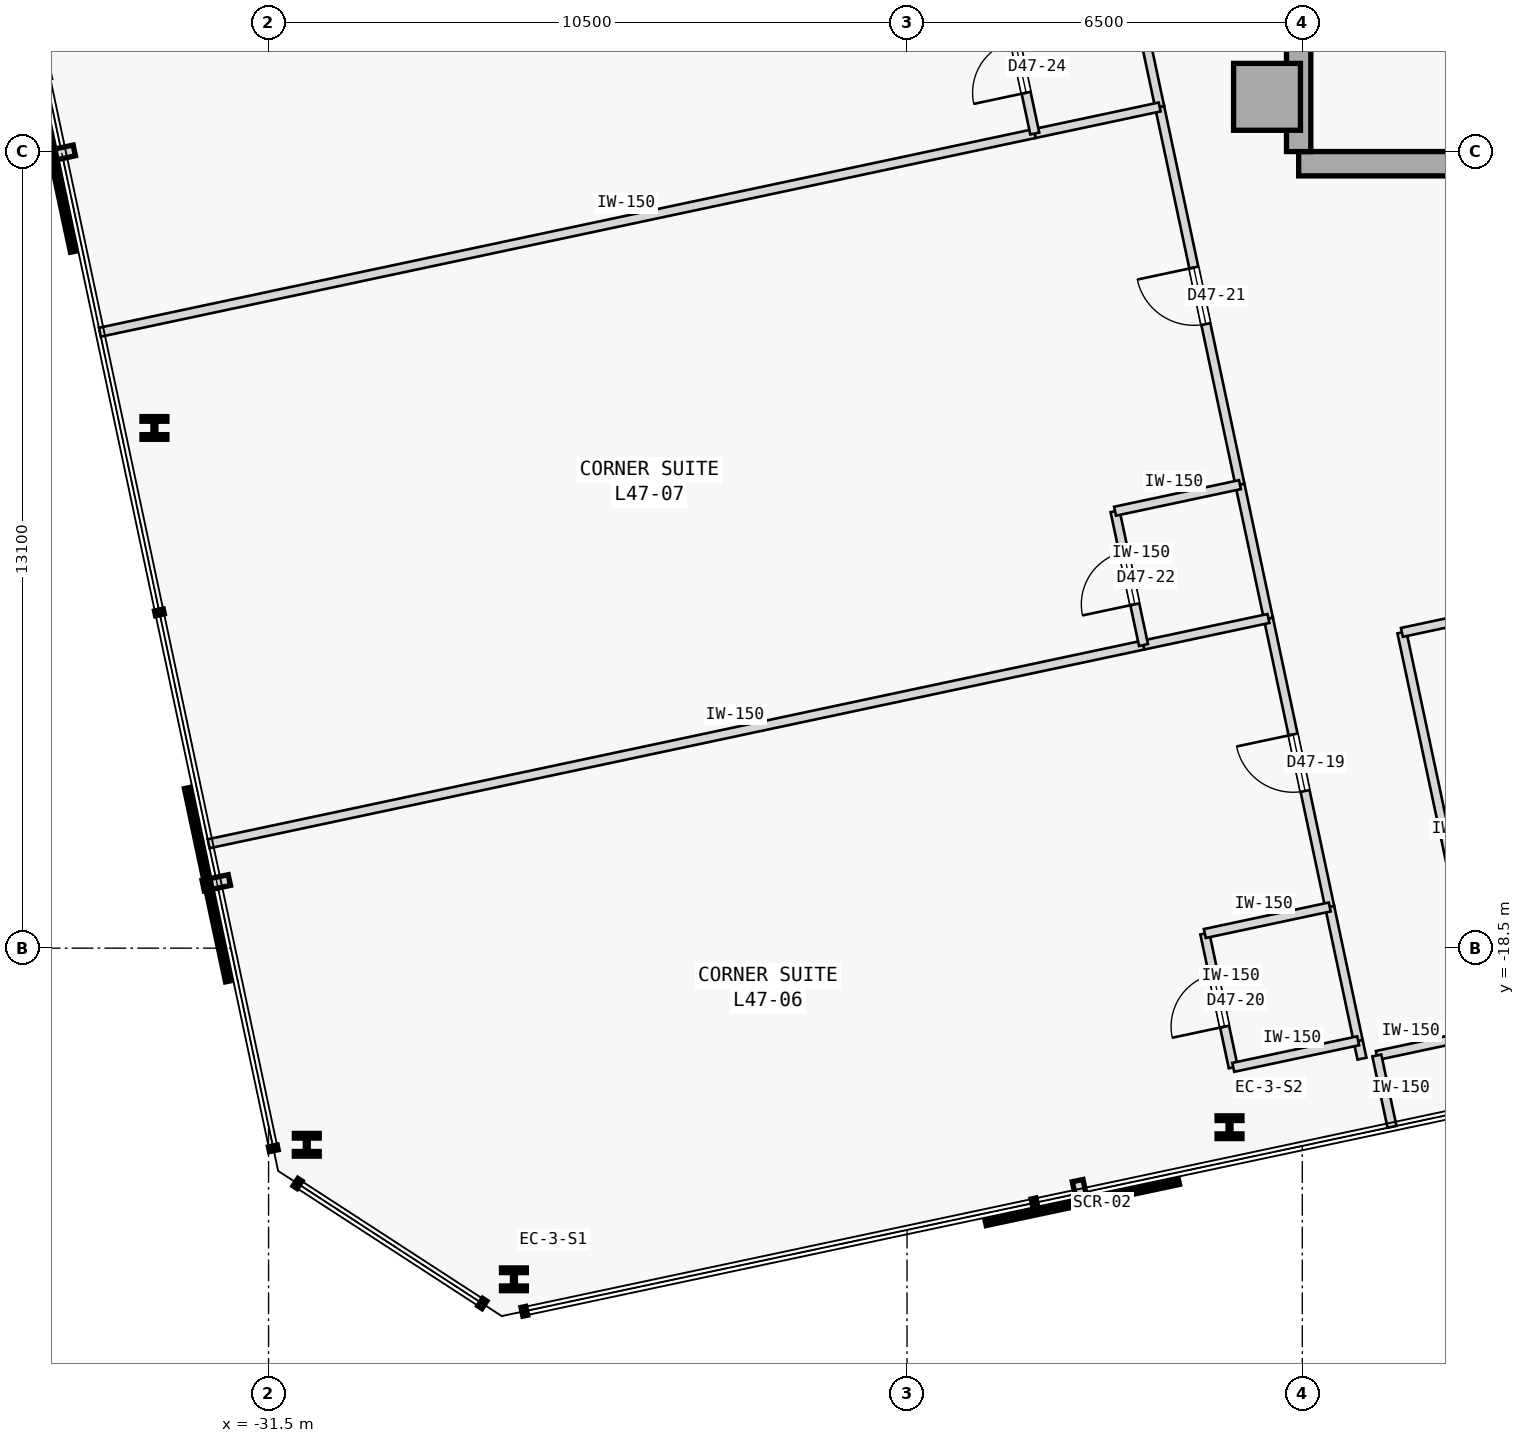
"""IFC4 building model, lengths in metres.
Left out: names, types, materials, properties, quantities, classifications, styles, units other than length and angle.
Written with IfcOpenShell. Run it as: python <this file> out.ifc"""

import sys

from ifc_helpers import new_model, si_unit, direction, frame, frame_2d, origin, origin_2d, place, context, subcontext, project, spatial, rectangle, i_section, extrude, element, fill, save


model = new_model("IFC4")
c1 = context("Model", 3, precision=1e-05, world=origin(), true_north=direction((0.0, 1.0)))
c2 = subcontext(c1, "Body", "Model", "MODEL_VIEW")
j1 = project(units=[si_unit("LENGTHUNIT", "METRE"), si_unit("PLANEANGLEUNIT", "RADIAN")], contexts=[c1])
p1 = place(None, origin())
s1 = spatial("IfcSite", under=j1, at=p1, CompositionType="ELEMENT")
p2 = place(p1, origin())
s2 = spatial("IfcBuilding", under=s1, at=p2, CompositionType="ELEMENT")
p3 = place(p2, frame((0.0, 0.0, 182.0)))
s3 = spatial("IfcBuildingStorey", under=s2, at=p3, CompositionType="ELEMENT", Elevation=182.0)
p4 = place(p3, frame((-15.08, -4.5, 0.0), z_axis=(0.0, 0.0, 1.0), x_axis=(1.0, 0.0, 0.0)))
e1 = element("IfcColumn", 1, at=p4, inside=s3, PredefinedType="COLUMN", context=c2, shape_type="SweptSolid", body=[
    extrude(rectangle(XDim=1.1, YDim=1.1, at=origin_2d()), origin(), (0.0, 0.0, 1.0), 3.4),
])
p5 = place(p3, frame((-14.56, -5.6, 0.0), z_axis=(0.0, 0.0, 1.0), x_axis=(1.0, 0.0, 0.0)))
e2 = element("IfcWall", 2, at=p5, inside=s3, PredefinedType="SHEAR", context=c2, shape_type="SweptSolid", body=[
    extrude(rectangle(XDim=10.86, YDim=0.4, at=frame_2d((5.43, 0.0))), origin(), (0.0, 0.0, 1.0), 3.175),
])
p6 = place(p3, frame((-14.56, -5.4, 0.0), z_axis=(0.0, 0.0, 1.0), x_axis=(0.0, 1.0, 0.0)))
e3 = element("IfcWall", 3, at=p6, inside=s3, PredefinedType="SHEAR", context=c2, shape_type="SweptSolid", body=[
    extrude(rectangle(XDim=10.8, YDim=0.4, at=frame_2d((5.4, 0.0))), origin(), (0.0, 0.0, 1.0), 3.175),
])
for number, where, z_axis, x_axis in (
    (4, (-27.465, -23.946, 0.0), (0.0, 0.0, 1.0), (1.0, 0.0, 0.0)),
    (5, (-15.697, -21.444, 0.0), (0.0, 0.0, 1.0), (1.0, 0.0, 0.0)),
    (6, (-33.377, -9.945, 0.0), (0.0, 0.0, 1.0), (1.0, 0.0, 0.0)),
    (7, (-30.871, -21.733, 0.0), (0.0, 0.0, 1.0), (1.0, 0.0, 0.0)),
):
    element("IfcColumn", number, at=place(p3, frame(where, z_axis=z_axis, x_axis=x_axis)), inside=s3, PredefinedType="COLUMN", context=c2, shape_type="SweptSolid", body=[
        extrude(i_section(OverallWidth=0.409, OverallDepth=0.374, WebThickness=0.048, FlangeThickness=0.077, FilletRadius=0.015, at=origin_2d()), origin(), (0.0, 0.0, 1.0), 3.4),
    ])
p7 = place(p3, frame((-13.274, -20.265, 0.0), z_axis=(0.0, 0.0, 1.0), x_axis=(0.978160192495, 0.207852442415, 0.0)))
e8 = element("IfcWall", 8, at=p7, inside=s3, PredefinedType="PARTITIONING", context=c2, shape_type="SweptSolid", body=[
    extrude(rectangle(XDim=1.85, YDim=0.15, at=frame_2d((0.925, 0.0))), origin(), (0.0, 0.0, 1.0), 3.175),
])
p8 = place(p3, frame((-11.465, -19.88, 0.0), z_axis=(0.0, 0.0, 1.0), x_axis=(-0.207916109912, 0.978146661416, 0.0)))
e9 = element("IfcWall", 9, at=p8, inside=s3, PredefinedType="PARTITIONING", context=c2, shape_type="SweptSolid", body=[
    extrude(rectangle(XDim=6.72, YDim=0.15, at=frame_2d((3.36, 0.0))), origin(), (0.0, 0.0, 1.0), 3.175),
])
p9 = place(p3, frame((-12.862, -13.307, 0.0), z_axis=(0.0, 0.0, 1.0), x_axis=(0.978144096287, 0.20792817726, 0.0)))
e10 = element("IfcWall", 10, at=p9, inside=s3, PredefinedType="PARTITIONING", context=c2, shape_type="SweptSolid", body=[
    extrude(rectangle(XDim=7.781, YDim=0.15, at=frame_2d((3.891, 0.0))), origin(), (0.0, 0.0, 1.0), 3.175),
])
p10 = place(p9, frame((3.43, 0.0, 0.0)))
e11 = element("IfcOpeningElement", 11, at=p10, cuts=e10, PredefinedType="OPENING", context=c2, shape_type="SweptSolid", body=[
    extrude(rectangle(XDim=0.92, YDim=2.15, at=frame_2d((0.46, 1.075))), frame((0.0, 0.085, 0.0), z_axis=(0.0, -1.0, 0.0), x_axis=(1.0, 0.0, 0.0)), (0.0, 0.0, 1.0), 0.17),
])
p11 = place(p3, frame((-13.519, -20.317, 0.0), z_axis=(0.0, 0.0, 1.0), x_axis=(-0.207527808066, 0.978229118806, 0.0)))
e12 = element("IfcWall", 12, at=p11, inside=s3, PredefinedType="PARTITIONING", context=c2, shape_type="SweptSolid", body=[
    extrude(rectangle(XDim=0.3, YDim=0.15, at=frame_2d((0.15, 0.0))), origin(), (0.0, 0.0, 1.0), 3.175),
])
p12 = place(p3, frame((-14.049, -17.823, 0.0), z_axis=(0.0, 0.0, 1.0), x_axis=(-0.2079027059, 0.978149510494, 0.0)))
e13 = element("IfcWall", 13, at=p12, inside=s3, PredefinedType="PARTITIONING", context=c2, shape_type="SweptSolid", body=[
    extrude(rectangle(XDim=4.85, YDim=0.15, at=frame_2d((2.425, 0.0))), origin(), (0.0, 0.0, 1.0), 3.175),
])
p13 = place(p12, frame((1.95, 0.0, 0.0)))
e14 = element("IfcOpeningElement", 14, at=p13, cuts=e13, PredefinedType="OPENING", context=c2, shape_type="SweptSolid", body=[
    extrude(rectangle(XDim=0.95, YDim=2.15, at=frame_2d((0.475, 1.075))), frame((0.0, 0.085, 0.0), z_axis=(0.0, -1.0, 0.0), x_axis=(1.0, 0.0, 0.0)), (0.0, 0.0, 1.0), 0.17),
])
p14 = place(p3, frame((-13.581, -20.023, 0.0), z_axis=(0.0, 0.0, 1.0), x_axis=(-0.207891197838, 0.978151956427, 0.0)))
e15 = element("IfcWall", 15, at=p14, inside=s3, PredefinedType="PARTITIONING", context=c2, shape_type="SweptSolid", body=[
    extrude(rectangle(XDim=2.25, YDim=0.15, at=frame_2d((1.125, 0.0))), origin(), (0.0, 0.0, 1.0), 3.175),
])
p15 = place(p3, frame((-15.525, -10.878, 0.0), z_axis=(0.0, 0.0, 1.0), x_axis=(-0.207887725283, 0.978152694459, 0.0)))
e16 = element("IfcWall", 16, at=p15, inside=s3, PredefinedType="PARTITIONING", context=c2, shape_type="SweptSolid", body=[
    extrude(rectangle(XDim=6.35, YDim=0.15, at=frame_2d((3.175, 0.0))), origin(), (0.0, 0.0, 1.0), 3.175),
])
p16 = place(p15, frame((2.7, 0.0, 0.0)))
e17 = element("IfcOpeningElement", 17, at=p16, cuts=e16, PredefinedType="OPENING", context=c2, shape_type="SweptSolid", body=[
    extrude(rectangle(XDim=0.95, YDim=2.15, at=frame_2d((0.475, 1.075))), frame((0.0, 0.085, 0.0), z_axis=(0.0, -1.0, 0.0), x_axis=(1.0, 0.0, 0.0)), (0.0, 0.0, 1.0), 0.17),
])
p17 = place(p3, frame((-15.057, -13.079, 0.0), z_axis=(0.0, 0.0, 1.0), x_axis=(-0.207995007687, 0.978129887478, 0.0)))
e18 = element("IfcWall", 18, at=p17, inside=s3, PredefinedType="PARTITIONING", context=c2, shape_type="SweptSolid", body=[
    extrude(rectangle(XDim=2.25, YDim=0.15, at=frame_2d((1.125, 0.0))), origin(), (0.0, 0.0, 1.0), 3.175),
])
p18 = place(p3, frame((-16.845, -4.667, 0.0), z_axis=(0.0, 0.0, 1.0), x_axis=(-0.207913264065, 0.978147266328, 0.0)))
e19 = element("IfcWall", 19, at=p18, inside=s3, PredefinedType="PARTITIONING", context=c2, shape_type="SweptSolid", body=[
    extrude(rectangle(XDim=2.25, YDim=0.15, at=frame_2d((1.125, 0.0))), origin(), (0.0, 0.0, 1.0), 3.175),
])
p19 = place(p3, frame((-13.025, -21.439, 0.0), z_axis=(0.0, 0.0, 1.0), x_axis=(-0.207917150959, 0.978146440129, 0.0)))
e20 = element("IfcWall", 20, at=p19, inside=s3, PredefinedType="PARTITIONING", context=c2, shape_type="SweptSolid", body=[
    extrude(rectangle(XDim=1.2, YDim=0.15, at=frame_2d((0.6, 0.0))), origin(), (0.0, 0.0, 1.0), 3.175),
])
p20 = place(p3, frame((-15.635, -20.46, 0.0), z_axis=(0.0, 0.0, 1.0), x_axis=(-0.207913264065, 0.978147266328, 0.0)))
e21 = element("IfcWall", 21, at=p20, inside=s3, PredefinedType="PARTITIONING", context=c2, shape_type="SweptSolid", body=[
    extrude(rectangle(XDim=2.25, YDim=0.15, at=frame_2d((1.125, 0.0))), origin(), (0.0, 0.0, 1.0), 3.175),
])
p21 = place(p20, frame((0.685, 0.0, 0.0)))
e22 = element("IfcOpeningElement", 22, at=p21, cuts=e21, PredefinedType="OPENING", context=c2, shape_type="SweptSolid", body=[
    extrude(rectangle(XDim=0.88, YDim=2.15, at=frame_2d((0.44, 1.075))), frame((0.0, 0.085, 0.0), z_axis=(0.0, -1.0, 0.0), x_axis=(1.0, 0.0, 0.0)), (0.0, 0.0, 1.0), 0.17),
])
for number, where, z_axis, x_axis in (
    (23, (-15.635, -20.46, 0.0), (0.0, 0.0, 1.0), (0.978, 0.208, 0.0)),
    (24, (-16.103, -18.259, 0.0), (0.0, 0.0, 1.0), (0.978, 0.208, 0.0)),
):
    element("IfcWall", number, at=place(p3, frame(where, z_axis=z_axis, x_axis=x_axis)), inside=s3, PredefinedType="PARTITIONING", context=c2, shape_type="SweptSolid", body=[
        extrude(rectangle(XDim=2.1, YDim=0.15, at=frame_2d((1.05, 0.0))), origin(), (0.0, 0.0, 1.0), 3.175),
    ])
p22 = place(p3, frame((-32.486, -16.783, 0.0), z_axis=(0.0, 0.0, 1.0), x_axis=(0.978146137903, 0.207918572776, 0.0)))
e25 = element("IfcWall", 25, at=p22, inside=s3, PredefinedType="PARTITIONING", context=c2, shape_type="SweptSolid", body=[
    extrude(rectangle(XDim=15.718, YDim=0.15, at=frame_2d((7.859, 0.0))), origin(), (0.0, 0.0, 1.0), 3.175),
])
p23 = place(p3, frame((-17.111, -13.515, 0.0), z_axis=(0.0, 0.0, 1.0), x_axis=(0.97815826, 0.207861536591, 0.0)))
e26 = element("IfcWall", 26, at=p23, inside=s3, PredefinedType="PARTITIONING", context=c2, shape_type="SweptSolid", body=[
    extrude(rectangle(XDim=2.1, YDim=0.15, at=frame_2d((1.05, 0.0))), origin(), (0.0, 0.0, 1.0), 3.175),
])
p24 = place(p3, frame((-17.111, -13.515, 0.0), z_axis=(0.0, 0.0, 1.0), x_axis=(-0.207913264065, 0.978147266328, 0.0)))
e27 = element("IfcWall", 27, at=p24, inside=s3, PredefinedType="PARTITIONING", context=c2, shape_type="SweptSolid", body=[
    extrude(rectangle(XDim=2.25, YDim=0.15, at=frame_2d((1.125, 0.0))), origin(), (0.0, 0.0, 1.0), 3.175),
])
p25 = place(p24, frame((0.685, 0.0, 0.0)))
e28 = element("IfcOpeningElement", 28, at=p25, cuts=e27, PredefinedType="OPENING", context=c2, shape_type="SweptSolid", body=[
    extrude(rectangle(XDim=0.88, YDim=2.15, at=frame_2d((0.44, 1.075))), frame((0.0, 0.085, 0.0), z_axis=(0.0, -1.0, 0.0), x_axis=(1.0, 0.0, 0.0)), (0.0, 0.0, 1.0), 0.17),
])
p26 = place(p3, frame((-17.579, -11.314, 0.0), z_axis=(0.0, 0.0, 1.0), x_axis=(0.978129588365, 0.207996414309, 0.0)))
e29 = element("IfcWall", 29, at=p26, inside=s3, PredefinedType="PARTITIONING", context=c2, shape_type="SweptSolid", body=[
    extrude(rectangle(XDim=2.1, YDim=0.15, at=frame_2d((1.05, 0.0))), origin(), (0.0, 0.0, 1.0), 3.175),
])
p27 = place(p3, frame((-34.274, -8.371, 0.0), z_axis=(0.0, 0.0, 1.0), x_axis=(0.978146137903, 0.207918572776, 0.0)))
e30 = element("IfcWall", 30, at=p27, inside=s3, PredefinedType="PARTITIONING", context=c2, shape_type="SweptSolid", body=[
    extrude(rectangle(XDim=15.718, YDim=0.15, at=frame_2d((7.859, 0.0))), origin(), (0.0, 0.0, 1.0), 3.175),
])
p28 = place(p3, frame((-18.899, -5.103, 0.0), z_axis=(0.0, 0.0, 1.0), x_axis=(0.97815826, 0.207861536591, 0.0)))
e31 = element("IfcWall", 31, at=p28, inside=s3, PredefinedType="PARTITIONING", context=c2, shape_type="SweptSolid", body=[
    extrude(rectangle(XDim=2.1, YDim=0.15, at=frame_2d((1.05, 0.0))), origin(), (0.0, 0.0, 1.0), 3.175),
])
p29 = place(p3, frame((-18.899, -5.103, 0.0), z_axis=(0.0, 0.0, 1.0), x_axis=(-0.207913264065, 0.978147266328, 0.0)))
e32 = element("IfcWall", 32, at=p29, inside=s3, PredefinedType="PARTITIONING", context=c2, shape_type="SweptSolid", body=[
    extrude(rectangle(XDim=2.25, YDim=0.15, at=frame_2d((1.125, 0.0))), origin(), (0.0, 0.0, 1.0), 3.175),
])
p30 = place(p29, frame((0.685, 0.0, 0.0)))
e33 = element("IfcOpeningElement", 33, at=p30, cuts=e32, PredefinedType="OPENING", context=c2, shape_type="SweptSolid", body=[
    extrude(rectangle(XDim=0.88, YDim=2.15, at=frame_2d((0.44, 1.075))), frame((0.0, 0.085, 0.0), z_axis=(0.0, -1.0, 0.0), x_axis=(1.0, 0.0, 0.0)), (0.0, 0.0, 1.0), 0.17),
])
p31 = place(p13, origin())
e34 = element("IfcDoor", 34, at=p31, inside=s3, OperationType="SINGLE_SWING_RIGHT", PredefinedType="DOOR", context=c2, shape_type="SweptSolid", body=[
    extrude(rectangle(XDim=0.95, YDim=2.15, at=frame_2d((0.475, 1.075))), frame((0.0, 0.025, 0.0), z_axis=(0.0, -1.0, 0.0), x_axis=(1.0, 0.0, 0.0)), (0.0, 0.0, 1.0), 0.05),
])
fill(e14, e34)
p32 = place(p21, origin())
e35 = element("IfcDoor", 35, at=p32, inside=s3, OperationType="SINGLE_SWING_LEFT", PredefinedType="DOOR", context=c2, shape_type="SweptSolid", body=[
    extrude(rectangle(XDim=0.88, YDim=2.15, at=frame_2d((0.44, 1.075))), frame((0.0, 0.025, 0.0), z_axis=(0.0, -1.0, 0.0), x_axis=(1.0, 0.0, 0.0)), (0.0, 0.0, 1.0), 0.05),
])
fill(e22, e35)
p33 = place(p16, origin())
e36 = element("IfcDoor", 36, at=p33, inside=s3, OperationType="SINGLE_SWING_RIGHT", PredefinedType="DOOR", context=c2, shape_type="SweptSolid", body=[
    extrude(rectangle(XDim=0.95, YDim=2.15, at=frame_2d((0.475, 1.075))), frame((0.0, 0.025, 0.0), z_axis=(0.0, -1.0, 0.0), x_axis=(1.0, 0.0, 0.0)), (0.0, 0.0, 1.0), 0.05),
])
fill(e17, e36)
p34 = place(p25, origin())
e37 = element("IfcDoor", 37, at=p34, inside=s3, OperationType="SINGLE_SWING_LEFT", PredefinedType="DOOR", context=c2, shape_type="SweptSolid", body=[
    extrude(rectangle(XDim=0.88, YDim=2.15, at=frame_2d((0.44, 1.075))), frame((0.0, 0.025, 0.0), z_axis=(0.0, -1.0, 0.0), x_axis=(1.0, 0.0, 0.0)), (0.0, 0.0, 1.0), 0.05),
])
fill(e28, e37)
p35 = place(p30, origin())
e38 = element("IfcDoor", 38, at=p35, inside=s3, OperationType="SINGLE_SWING_LEFT", PredefinedType="DOOR", context=c2, shape_type="SweptSolid", body=[
    extrude(rectangle(XDim=0.88, YDim=2.15, at=frame_2d((0.44, 1.075))), frame((0.0, 0.025, 0.0), z_axis=(0.0, -1.0, 0.0), x_axis=(1.0, 0.0, 0.0)), (0.0, 0.0, 1.0), 0.05),
])
fill(e33, e38)
save(model, sys.argv[1])
